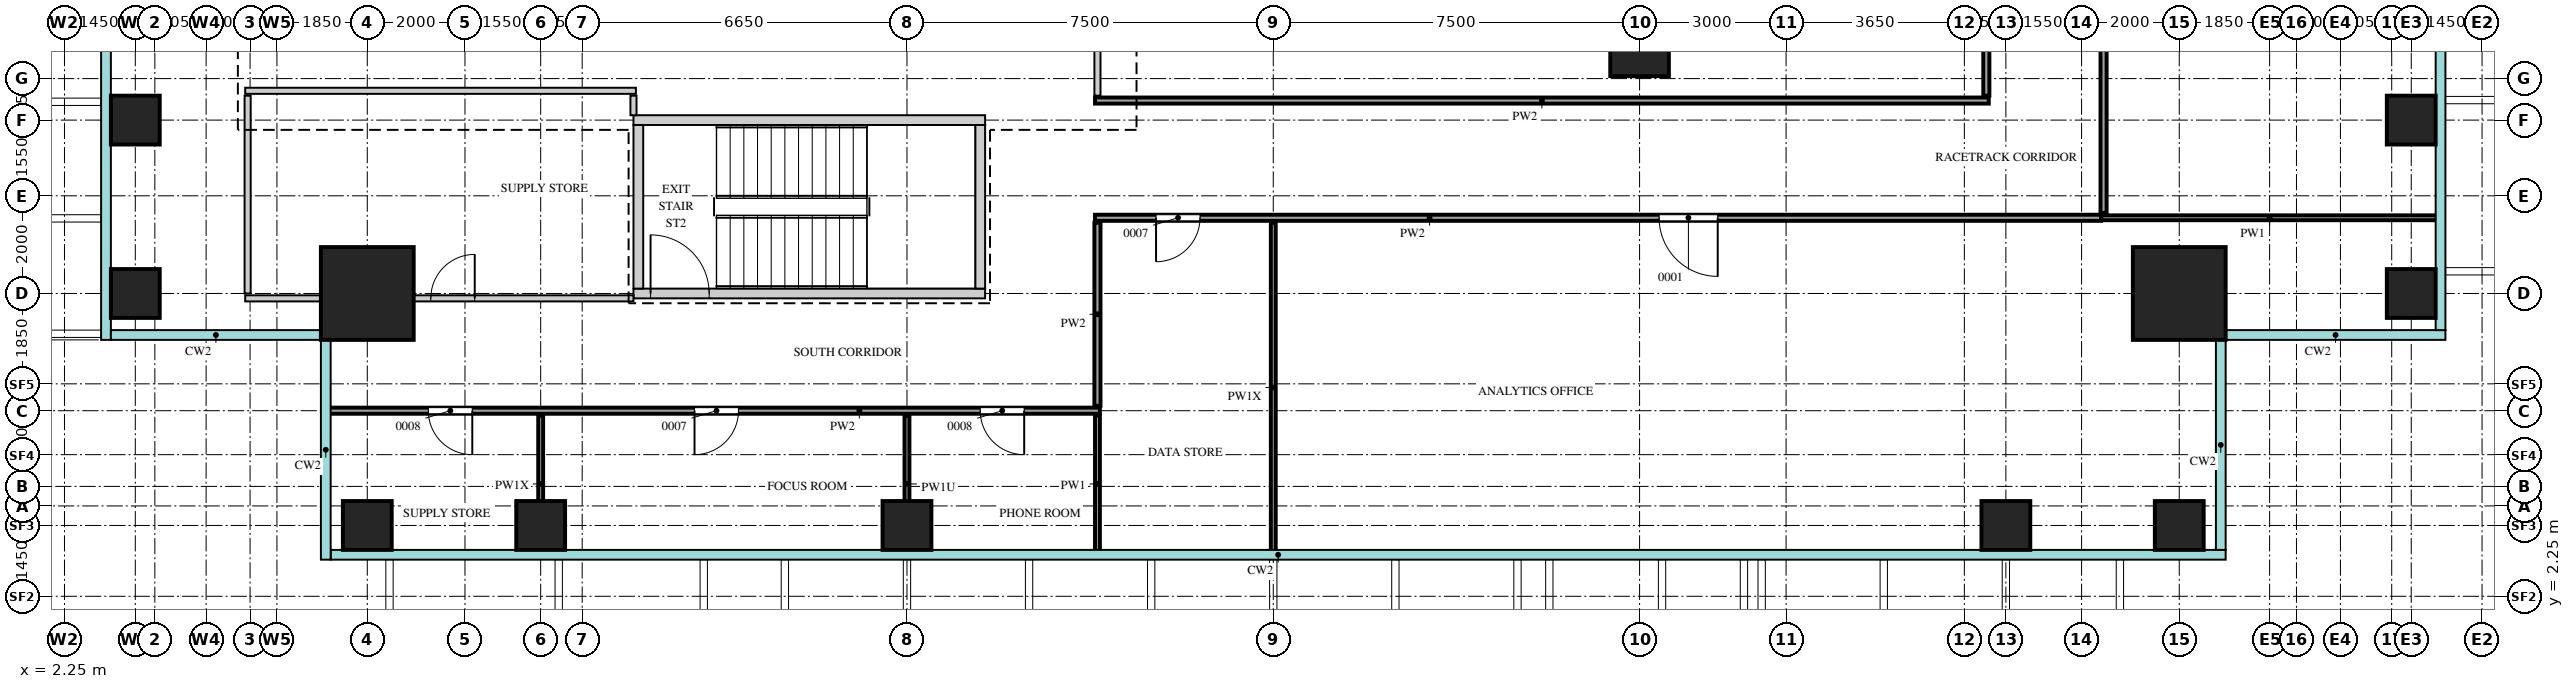
"""IFC4 building model, lengths in metres.
Left out: names, types, materials, properties, quantities, classifications, styles, units other than length and angle.
Written with IfcOpenShell. Run it as: python <this file> out.ifc"""

import sys

from ifc_helpers import new_model, si_unit, direction, frame, frame_2d, origin, origin_2d, place, context, subcontext, project, spatial, rectangle, extrude, source, transform, mapped, element, fill, save


model = new_model("IFC4")
c1 = context("Model", 3, precision=1e-05, world=origin(), true_north=direction((0.0, 1.0)))
c2 = subcontext(c1, "Body", "Model", "MODEL_VIEW")
j1 = project(units=[si_unit("LENGTHUNIT", "METRE"), si_unit("PLANEANGLEUNIT", "RADIAN")], contexts=[c1])
p1 = place(None, origin())
s1 = spatial("IfcSite", under=j1, at=p1, CompositionType="ELEMENT")
p2 = place(p1, origin())
s2 = spatial("IfcBuilding", under=s1, at=p2, CompositionType="ELEMENT")
p3 = place(p2, frame((0.0, 0.0, 212.7)))
s3 = spatial("IfcBuildingStorey", under=s2, at=p3, CompositionType="ELEMENT", Elevation=212.7)
m1 = source(origin(), c2, "Body", "SweptSolid", [
    extrude(rectangle(XDim=7.2, YDim=0.2, at=frame_2d((3.6, 0.0))), origin(), (0.0, 0.0, 1.0), 3.75),
])
p4 = place(p3, frame((13.9, 12.0, 0.0), z_axis=(0.0, 0.0, 1.0), x_axis=(1.0, 0.0, 0.0)))
e1 = element("IfcWall", 1, at=p4, inside=s3, PredefinedType="SHEAR", context=c2, shape_type="MappedRepresentation", body=[
    mapped(m1, transform((0.0, 0.0, 0.0))),
])
p5 = place(p3, frame((13.9, 8.45, 0.0), z_axis=(0.0, 0.0, 1.0), x_axis=(1.0, 0.0, 0.0)))
e2 = element("IfcWall", 2, at=p5, inside=s3, PredefinedType="SHEAR", context=c2, shape_type="MappedRepresentation", body=[
    mapped(m1, transform((0.0, 0.0, 0.0))),
])
m2 = source(origin(), c2, "Body", "SweptSolid", [
    extrude(rectangle(XDim=1.2, YDim=2.1, at=frame_2d((0.6, 1.05))), frame((0.0, 0.11, 0.0), z_axis=(0.0, -1.0, 0.0), x_axis=(1.0, 0.0, 0.0)), (0.0, 0.0, 1.0), 0.22),
])
p6 = place(p5, frame((0.35, 0.0, 0.0)))
e3 = element("IfcOpeningElement", 3, at=p6, cuts=e2, PredefinedType="OPENING", context=c2, shape_type="MappedRepresentation", body=[
    mapped(m2, transform((0.0, 0.0, 0.0))),
])
m3 = source(origin(), c2, "Body", "SweptSolid", [
    extrude(rectangle(XDim=3.35, YDim=0.2, at=frame_2d((1.675, 0.0))), origin(), (0.0, 0.0, 1.0), 3.75),
])
for number, where, z_axis, x_axis in (
    (4, (21.0, 8.55, 0.0), (0.0, 0.0, 1.0), (0.0, 1.0, 0.0)),
    (5, (14.0, 8.55, 0.0), (0.0, 0.0, 1.0), (0.0, 1.0, 0.0)),
):
    element("IfcWall", number, at=place(p3, frame(where, z_axis=z_axis, x_axis=x_axis)), inside=s3, PredefinedType="SHEAR", context=c2, shape_type="MappedRepresentation", body=[
        mapped(m3, transform((0.0, 0.0, 0.0))),
    ])
m4 = source(origin(), c2, "Body", "SweptSolid", [
    extrude(rectangle(XDim=1.9, YDim=1.9, at=origin_2d()), origin(), (0.0, 0.0, 1.0), 4.0),
])
for number, where, z_axis, x_axis in (
    (6, (45.55, 8.45, 0.0), (0.0, 0.0, 1.0), (1.0, 0.0, 0.0)),
    (7, (8.45, 8.45, 0.0), (0.0, 0.0, 1.0), (1.0, 0.0, 0.0)),
):
    element("IfcColumn", number, at=place(p3, frame(where, z_axis=z_axis, x_axis=x_axis)), inside=s3, PredefinedType="COLUMN", context=c2, shape_type="MappedRepresentation", body=[
        mapped(m4, transform((0.0, 0.0, 0.0))),
    ])
m5 = source(origin(), c2, "Body", "SweptSolid", [
    extrude(rectangle(XDim=1.0, YDim=1.0, at=origin_2d()), origin(), (0.0, 0.0, 1.0), 4.0),
])
for number, where, z_axis, x_axis in (
    (8, (8.45, 3.7, 0.0), (0.0, 0.0, 1.0), (1.0, 0.0, 0.0)),
    (9, (12.0, 3.7, 0.0), (0.0, 0.0, 1.0), (1.0, 0.0, 0.0)),
    (10, (19.5, 3.7, 0.0), (0.0, 0.0, 1.0), (1.0, 0.0, 0.0)),
    (11, (42.0, 3.7, 0.0), (0.0, 0.0, 1.0), (1.0, 0.0, 0.0)),
    (12, (45.55, 3.7, 0.0), (0.0, 0.0, 1.0), (1.0, 0.0, 0.0)),
    (13, (50.3, 8.45, 0.0), (0.0, 0.0, 1.0), (1.0, 0.0, 0.0)),
    (14, (50.3, 12.0, 0.0), (0.0, 0.0, 1.0), (1.0, 0.0, 0.0)),
    (15, (3.7, 8.45, 0.0), (0.0, 0.0, 1.0), (1.0, 0.0, 0.0)),
    (16, (3.7, 12.0, 0.0), (0.0, 0.0, 1.0), (1.0, 0.0, 0.0)),
):
    element("IfcColumn", number, at=place(p3, frame(where, z_axis=z_axis, x_axis=x_axis)), inside=s3, PredefinedType="COLUMN", context=c2, shape_type="MappedRepresentation", body=[
        mapped(m5, transform((0.0, 0.0, 0.0))),
    ])
m6 = source(origin(), c2, "Body", "SweptSolid", [
    extrude(rectangle(XDim=1.2, YDim=1.2, at=origin_2d()), origin(), (0.0, 0.0, 1.0), 4.0),
])
p7 = place(p3, frame((34.5, 13.5, 0.0), z_axis=(0.0, 0.0, 1.0), x_axis=(1.0, 0.0, 0.0)))
e17 = element("IfcColumn", 17, at=p7, inside=s3, PredefinedType="COLUMN", context=c2, shape_type="MappedRepresentation", body=[
    mapped(m6, transform((0.0, 0.0, 0.0))),
])
m7 = source(origin(), c2, "Body", "SweptSolid", [
    extrude(rectangle(XDim=2.8, YDim=0.1, at=frame_2d((1.4, 0.0))), origin(), (0.0, 0.0, 1.0), 3.15),
])
p8 = place(p3, frame((12.0, 3.15, 0.0), z_axis=(0.0, 0.0, 1.0), x_axis=(0.0, 1.0, 0.0)))
e18 = element("IfcWall", 18, at=p8, inside=s3, PredefinedType="PARTITIONING", context=c2, shape_type="MappedRepresentation", body=[
    mapped(m7, transform((0.0, 0.0, 0.0))),
])
m8 = source(origin(), c2, "Body", "SweptSolid", [
    extrude(rectangle(XDim=2.8, YDim=0.1, at=frame_2d((1.4, 0.0))), origin(), (0.0, 0.0, 1.0), 3.27),
])
p9 = place(p3, frame((19.5, 3.15, 0.0), z_axis=(0.0, 0.0, 1.0), x_axis=(0.0, 1.0, 0.0)))
e19 = element("IfcWall", 19, at=p9, inside=s3, PredefinedType="PARTITIONING", context=c2, shape_type="MappedRepresentation", body=[
    mapped(m8, transform((0.0, 0.0, 0.0))),
])
m9 = source(origin(), c2, "Body", "SweptSolid", [
    extrude(rectangle(XDim=2.8, YDim=0.1, at=frame_2d((1.4, 0.0))), origin(), (0.0, 0.0, 1.0), 3.8),
])
p10 = place(p3, frame((23.4, 3.15, 0.0), z_axis=(0.0, 0.0, 1.0), x_axis=(0.0, 1.0, 0.0)))
e20 = element("IfcWall", 20, at=p10, inside=s3, PredefinedType="PARTITIONING", context=c2, shape_type="MappedRepresentation", body=[
    mapped(m9, transform((0.0, 0.0, 0.0))),
])
m10 = source(origin(), c2, "Body", "SweptSolid", [
    extrude(rectangle(XDim=6.75, YDim=0.1, at=frame_2d((3.375, 0.0))), origin(), (0.0, 0.0, 1.0), 3.15),
])
p11 = place(p3, frame((27.0, 3.15, 0.0), z_axis=(0.0, 0.0, 1.0), x_axis=(0.0, 1.0, 0.0)))
e21 = element("IfcWall", 21, at=p11, inside=s3, PredefinedType="PARTITIONING", context=c2, shape_type="MappedRepresentation", body=[
    mapped(m10, transform((0.0, 0.0, 0.0))),
])
m11 = source(origin(), c2, "Body", "SweptSolid", [
    extrude(rectangle(XDim=15.8, YDim=0.125, at=frame_2d((7.9, 0.0))), origin(), (0.0, 0.0, 1.0), 3.8),
])
p12 = place(p3, frame((7.65, 6.05, 0.0), z_axis=(0.0, 0.0, 1.0), x_axis=(1.0, 0.0, 0.0)))
e22 = element("IfcWall", 22, at=p12, inside=s3, PredefinedType="PARTITIONING", context=c2, shape_type="MappedRepresentation", body=[
    mapped(m11, transform((0.0, 0.0, 0.0))),
])
m12 = source(origin(), c2, "Body", "SweptSolid", [
    extrude(rectangle(XDim=0.9, YDim=2.1, at=frame_2d((0.45, 1.05))), frame((0.0, 0.073, 0.0), z_axis=(0.0, -1.0, 0.0), x_axis=(1.0, 0.0, 0.0)), (0.0, 0.0, 1.0), 0.145),
])
p13 = place(p12, frame((2.05, 0.0, 0.0)))
e23 = element("IfcOpeningElement", 23, at=p13, cuts=e22, PredefinedType="OPENING", context=c2, shape_type="MappedRepresentation", body=[
    mapped(m12, transform((0.0, 0.0, 0.0))),
])
p14 = place(p12, frame((7.5, 0.0, 0.0)))
e24 = element("IfcOpeningElement", 24, at=p14, cuts=e22, PredefinedType="OPENING", context=c2, shape_type="MappedRepresentation", body=[
    mapped(m12, transform((0.0, 0.0, 0.0))),
])
p15 = place(p12, frame((13.35, 0.0, 0.0)))
e25 = element("IfcOpeningElement", 25, at=p15, cuts=e22, PredefinedType="OPENING", context=c2, shape_type="MappedRepresentation", body=[
    mapped(m12, transform((0.0, 0.0, 0.0))),
])
m13 = source(origin(), c2, "Body", "SweptSolid", [
    extrude(rectangle(XDim=3.75, YDim=0.125, at=frame_2d((1.875, 0.0))), origin(), (0.0, 0.0, 1.0), 3.8),
])
p16 = place(p3, frame((23.4, 6.15, 0.0), z_axis=(0.0, 0.0, 1.0), x_axis=(0.0, 1.0, 0.0)))
e26 = element("IfcWall", 26, at=p16, inside=s3, PredefinedType="PARTITIONING", context=c2, shape_type="MappedRepresentation", body=[
    mapped(m13, transform((0.0, 0.0, 0.0))),
])
m14 = source(origin(), c2, "Body", "SweptSolid", [
    extrude(rectangle(XDim=7.95, YDim=0.125, at=frame_2d((3.975, 0.0))), origin(), (0.0, 0.0, 1.0), 3.1),
])
p17 = place(p3, frame((5.95, 8.35, 0.0), z_axis=(0.0, 0.0, 1.0), x_axis=(1.0, 0.0, 0.0)))
e27 = element("IfcWall", 27, at=p17, inside=s3, PredefinedType="PARTITIONING", context=c2, shape_type="MappedRepresentation", body=[
    mapped(m14, transform((0.0, 0.0, 0.0))),
])
p18 = place(p17, frame((3.8, 0.0, 0.0)))
e28 = element("IfcOpeningElement", 28, at=p18, cuts=e27, PredefinedType="OPENING", context=c2, shape_type="MappedRepresentation", body=[
    mapped(m12, transform((0.0, 0.0, 0.0))),
])
m15 = source(origin(), c2, "Body", "SweptSolid", [
    extrude(rectangle(XDim=4.05, YDim=0.125, at=frame_2d((2.025, 0.0))), origin(), (0.0, 0.0, 1.0), 3.8),
])
p19 = place(p3, frame((6.0, 8.45, 0.0), z_axis=(0.0, 0.0, 1.0), x_axis=(0.0, 1.0, 0.0)))
e29 = element("IfcWall", 29, at=p19, inside=s3, PredefinedType="PARTITIONING", context=c2, shape_type="MappedRepresentation", body=[
    mapped(m15, transform((0.0, 0.0, 0.0))),
])
m16 = source(origin(), c2, "Body", "SweptSolid", [
    extrude(rectangle(XDim=20.6, YDim=0.125, at=frame_2d((10.3, 0.0))), origin(), (0.0, 0.0, 1.0), 3.8),
])
p20 = place(p3, frame((23.35, 10.0, 0.0), z_axis=(0.0, 0.0, 1.0), x_axis=(1.0, 0.0, 0.0)))
e30 = element("IfcWall", 30, at=p20, inside=s3, PredefinedType="PARTITIONING", context=c2, shape_type="MappedRepresentation", body=[
    mapped(m16, transform((0.0, 0.0, 0.0))),
])
p21 = place(p20, frame((1.25, 0.0, 0.0)))
e31 = element("IfcOpeningElement", 31, at=p21, cuts=e30, PredefinedType="OPENING", context=c2, shape_type="MappedRepresentation", body=[
    mapped(m12, transform((0.0, 0.0, 0.0))),
])
m17 = source(origin(), c2, "Body", "SweptSolid", [
    extrude(rectangle(XDim=1.2, YDim=2.1, at=frame_2d((0.6, 1.05))), frame((0.0, 0.073, 0.0), z_axis=(0.0, -1.0, 0.0), x_axis=(1.0, 0.0, 0.0)), (0.0, 0.0, 1.0), 0.145),
])
p22 = place(p20, frame((11.55, 0.0, 0.0)))
e32 = element("IfcOpeningElement", 32, at=p22, cuts=e30, PredefinedType="OPENING", context=c2, shape_type="MappedRepresentation", body=[
    mapped(m17, transform((0.0, 0.0, 0.0))),
])
m18 = source(origin(), c2, "Body", "SweptSolid", [
    extrude(rectangle(XDim=6.9, YDim=0.1, at=frame_2d((3.45, 0.0))), origin(), (0.0, 0.0, 1.0), 3.8),
])
p23 = place(p3, frame((43.95, 10.0, 0.0), z_axis=(0.0, 0.0, 1.0), x_axis=(1.0, 0.0, 0.0)))
e33 = element("IfcWall", 33, at=p23, inside=s3, PredefinedType="PARTITIONING", context=c2, shape_type="MappedRepresentation", body=[
    mapped(m18, transform((0.0, 0.0, 0.0))),
])
m19 = source(origin(), c2, "Body", "SweptSolid", [
    extrude(rectangle(XDim=33.8, YDim=0.125, at=frame_2d((16.9, 0.0))), origin(), (0.0, 0.0, 1.0), 3.8),
])
p24 = place(p3, frame((44.0, 10.1, 0.0), z_axis=(0.0, 0.0, 1.0), x_axis=(0.0, 1.0, 0.0)))
e34 = element("IfcWall", 34, at=p24, inside=s3, PredefinedType="PARTITIONING", context=c2, shape_type="MappedRepresentation", body=[
    mapped(m19, transform((0.0, 0.0, 0.0))),
])
p25 = place(p24, frame((12.75, 0.0, 0.0)))
e35 = element("IfcOpeningElement", 35, at=p25, cuts=e34, PredefinedType="OPENING", context=c2, shape_type="MappedRepresentation", body=[
    mapped(m17, transform((0.0, 0.0, 0.0))),
])
p26 = place(p24, frame((27.35, 0.0, 0.0)))
e36 = element("IfcOpeningElement", 36, at=p26, cuts=e34, PredefinedType="OPENING", context=c2, shape_type="MappedRepresentation", body=[
    mapped(m12, transform((0.0, 0.0, 0.0))),
])
m20 = source(origin(), c2, "Body", "SweptSolid", [
    extrude(rectangle(XDim=0.4, YDim=0.125, at=frame_2d((0.2, 0.0))), origin(), (0.0, 0.0, 1.0), 3.8),
])
p27 = place(p3, frame((13.9, 12.1, 0.0), z_axis=(0.0, 0.0, 1.0), x_axis=(0.0, 1.0, 0.0)))
e37 = element("IfcWall", 37, at=p27, inside=s3, PredefinedType="PARTITIONING", context=c2, shape_type="MappedRepresentation", body=[
    mapped(m20, transform((0.0, 0.0, 0.0))),
])
m21 = source(origin(), c2, "Body", "SweptSolid", [
    extrude(rectangle(XDim=18.3, YDim=0.125, at=frame_2d((9.15, 0.0))), origin(), (0.0, 0.0, 1.0), 3.8),
])
p28 = place(p3, frame((23.35, 12.4, 0.0), z_axis=(0.0, 0.0, 1.0), x_axis=(1.0, 0.0, 0.0)))
e38 = element("IfcWall", 38, at=p28, inside=s3, PredefinedType="PARTITIONING", context=c2, shape_type="MappedRepresentation", body=[
    mapped(m21, transform((0.0, 0.0, 0.0))),
])
m22 = source(origin(), c2, "Body", "SweptSolid", [
    extrude(rectangle(XDim=23.4, YDim=0.125, at=frame_2d((11.7, 0.0))), origin(), (0.0, 0.0, 1.0), 3.8),
])
p29 = place(p3, frame((23.4, 12.5, 0.0), z_axis=(0.0, 0.0, 1.0), x_axis=(0.0, 1.0, 0.0)))
e39 = element("IfcWall", 39, at=p29, inside=s3, PredefinedType="PARTITIONING", context=c2, shape_type="MappedRepresentation", body=[
    mapped(m22, transform((0.0, 0.0, 0.0))),
])
p30 = place(p29, frame((11.1, 0.0, 0.0)))
e40 = element("IfcOpeningElement", 40, at=p30, cuts=e39, PredefinedType="OPENING", context=c2, shape_type="MappedRepresentation", body=[
    mapped(m17, transform((0.0, 0.0, 0.0))),
])
m23 = source(origin(), c2, "Body", "SweptSolid", [
    extrude(rectangle(XDim=29.0, YDim=0.125, at=frame_2d((14.5, 0.0))), origin(), (0.0, 0.0, 1.0), 3.8),
])
p31 = place(p3, frame((41.6, 12.5, 0.0), z_axis=(0.0, 0.0, 1.0), x_axis=(0.0, 1.0, 0.0)))
e41 = element("IfcWall", 41, at=p31, inside=s3, PredefinedType="PARTITIONING", context=c2, shape_type="MappedRepresentation", body=[
    mapped(m23, transform((0.0, 0.0, 0.0))),
])
p32 = place(p31, frame((25.7, 0.0, 0.0)))
e42 = element("IfcOpeningElement", 42, at=p32, cuts=e41, PredefinedType="OPENING", context=c2, shape_type="MappedRepresentation", body=[
    mapped(m12, transform((0.0, 0.0, 0.0))),
])
m24 = source(origin(), c2, "Body", "SweptSolid", [
    extrude(rectangle(XDim=8.0, YDim=0.125, at=frame_2d((4.0, 0.0))), origin(), (0.0, 0.0, 1.0), 3.8),
])
p33 = place(p3, frame((5.95, 12.6, 0.0), z_axis=(0.0, 0.0, 1.0), x_axis=(1.0, 0.0, 0.0)))
e43 = element("IfcWall", 43, at=p33, inside=s3, PredefinedType="PARTITIONING", context=c2, shape_type="MappedRepresentation", body=[
    mapped(m24, transform((0.0, 0.0, 0.0))),
])
m25 = source(origin(), c2, "Body", "SweptSolid", [
    extrude(rectangle(XDim=0.9, YDim=2.1, at=frame_2d((0.45, 1.05))), frame((0.0, 0.025, 0.0), z_axis=(0.0, -1.0, 0.0), x_axis=(1.0, 0.0, 0.0)), (0.0, 0.0, 1.0), 0.05),
])
p34 = place(p21, origin())
e44 = element("IfcDoor", 44, at=p34, inside=s3, OperationType="SINGLE_SWING_LEFT", PredefinedType="DOOR", context=c2, shape_type="MappedRepresentation", body=[
    mapped(m25, transform((0.0, 0.0, 0.0))),
])
fill(e31, e44)
m26 = source(origin(), c2, "Body", "SweptSolid", [
    extrude(rectangle(XDim=1.2, YDim=2.1, at=frame_2d((0.6, 1.05))), frame((0.0, 0.025, 0.0), z_axis=(0.0, -1.0, 0.0), x_axis=(1.0, 0.0, 0.0)), (0.0, 0.0, 1.0), 0.05),
])
p35 = place(p22, origin())
e45 = element("IfcDoor", 45, at=p35, inside=s3, OperationType="SINGLE_SWING_RIGHT", PredefinedType="DOOR", context=c2, shape_type="MappedRepresentation", body=[
    mapped(m26, transform((0.0, 0.0, 0.0))),
])
fill(e32, e45)
p36 = place(p18, origin())
e46 = element("IfcDoor", 46, at=p36, inside=s3, OperationType="SINGLE_SWING_LEFT", PredefinedType="DOOR", context=c2, shape_type="MappedRepresentation", body=[
    mapped(m25, transform((0.0, 0.0, 0.0))),
])
fill(e28, e46)
p37 = place(p13, origin())
e47 = element("IfcDoor", 47, at=p37, inside=s3, OperationType="SINGLE_SWING_RIGHT", PredefinedType="DOOR", context=c2, shape_type="MappedRepresentation", body=[
    mapped(m25, transform((0.0, 0.0, 0.0))),
])
fill(e23, e47)
p38 = place(p14, origin())
e48 = element("IfcDoor", 48, at=p38, inside=s3, OperationType="SINGLE_SWING_LEFT", PredefinedType="DOOR", context=c2, shape_type="MappedRepresentation", body=[
    mapped(m25, transform((0.0, 0.0, 0.0))),
])
fill(e24, e48)
p39 = place(p15, origin())
e49 = element("IfcDoor", 49, at=p39, inside=s3, OperationType="SINGLE_SWING_RIGHT", PredefinedType="DOOR", context=c2, shape_type="MappedRepresentation", body=[
    mapped(m25, transform((0.0, 0.0, 0.0))),
])
fill(e25, e49)
p40 = place(p6, origin())
e50 = element("IfcDoor", 50, at=p40, inside=s3, OperationType="SINGLE_SWING_RIGHT", PredefinedType="DOOR", context=c2, shape_type="MappedRepresentation", body=[
    mapped(m26, transform((0.0, 0.0, 0.0))),
])
fill(e3, e50)
save(model, sys.argv[1])
